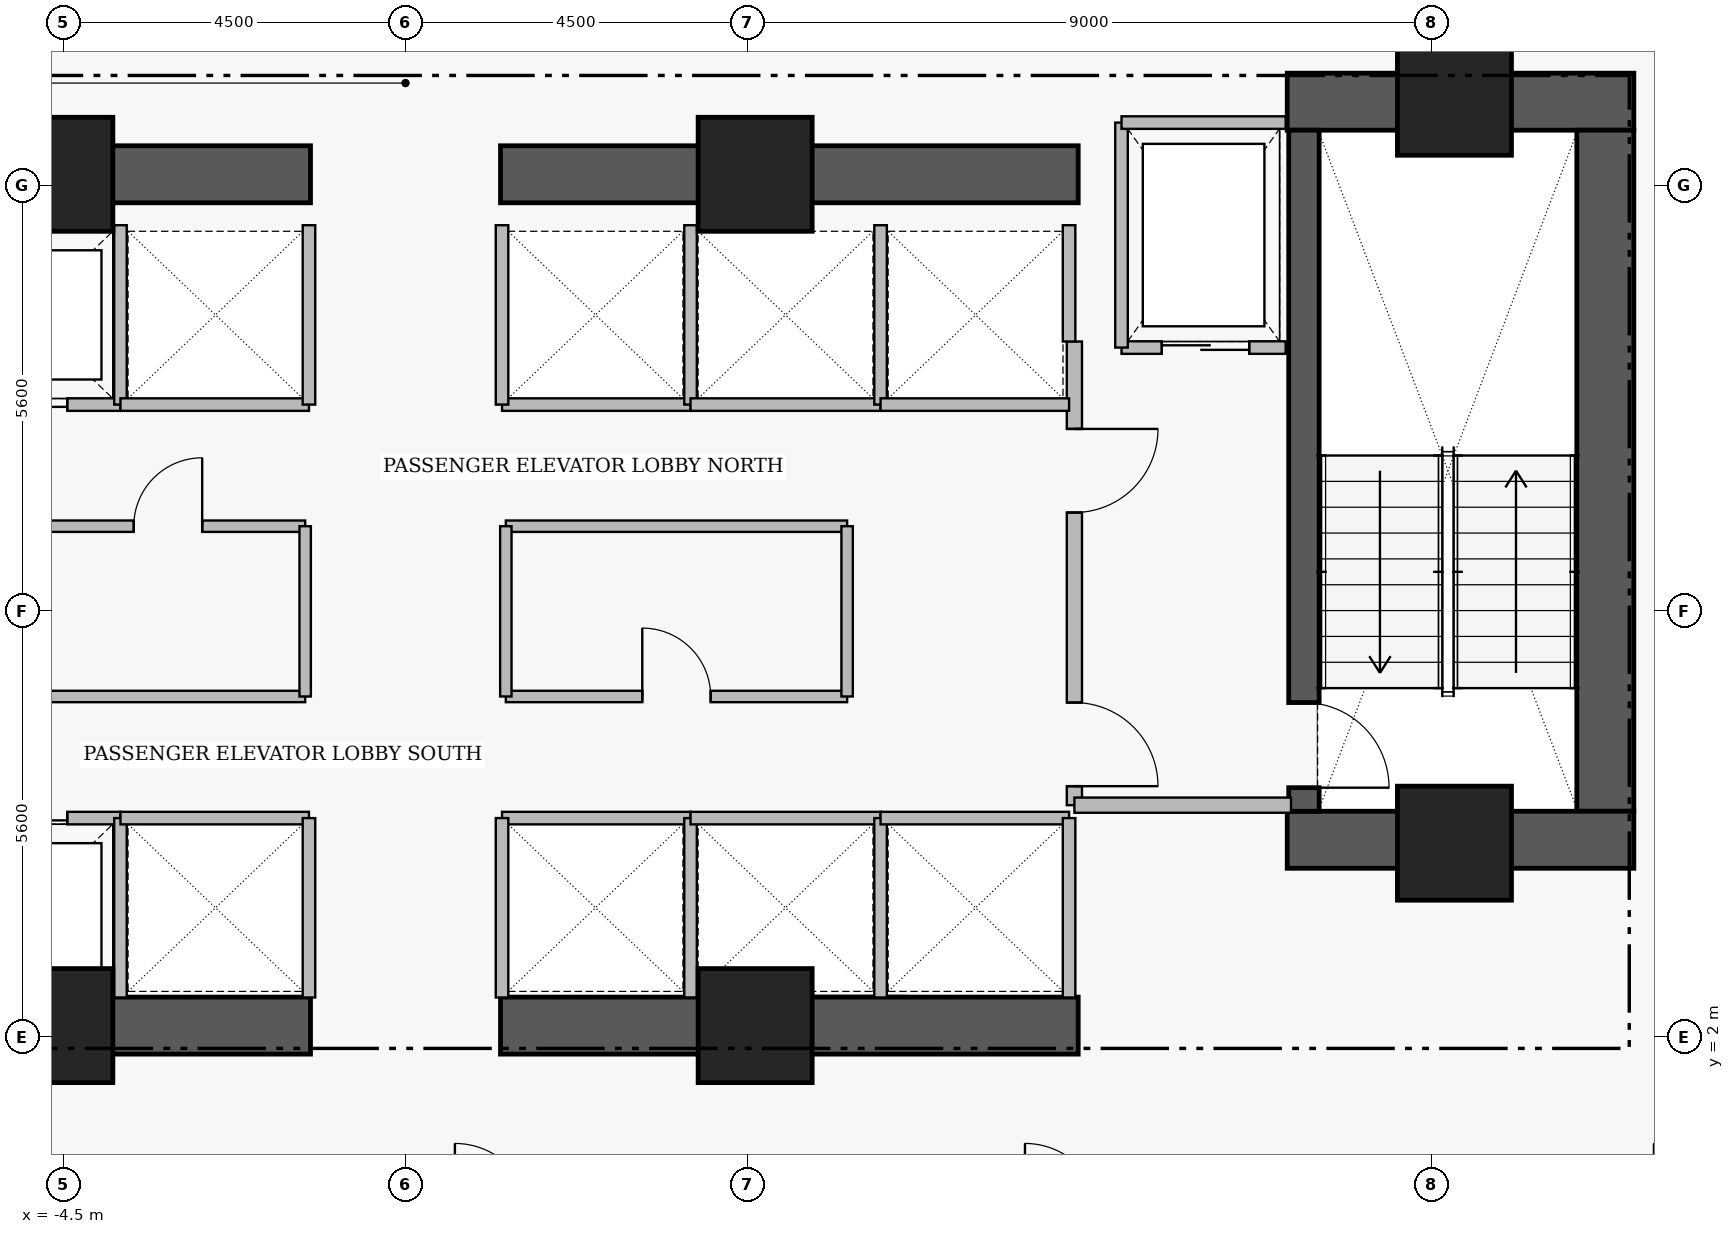
"""IFC4 building model, lengths in metres.
Left out: names, types, materials, properties, quantities, classifications, styles, units other than length and angle.
Written with IfcOpenShell. Run it as: python <this file> out.ifc"""

import sys

from ifc_helpers import new_model, si_unit, direction, frame, frame_2d, origin, origin_2d, place, context, subcontext, project, spatial, rectangle, extrude, element, fill, save


model = new_model("IFC4")
c1 = context("Model", 3, precision=1e-05, world=origin(), true_north=direction((0.0, 1.0)))
c2 = subcontext(c1, "Body", "Model", "MODEL_VIEW")
j1 = project(units=[si_unit("LENGTHUNIT", "METRE"), si_unit("PLANEANGLEUNIT", "RADIAN")], contexts=[c1])
p1 = place(None, origin())
s1 = spatial("IfcSite", under=j1, at=p1, CompositionType="ELEMENT")
p2 = place(p1, origin())
s2 = spatial("IfcBuilding", under=s1, at=p2, CompositionType="ELEMENT")
p3 = place(p2, frame((0.0, 0.0, 95.65)))
s3 = spatial("IfcBuildingStorey", under=s2, at=p3, CompositionType="ELEMENT", Elevation=95.65)
p4 = place(p3, frame((11.6, 14.305, 0.0), z_axis=(0.0, 0.0, 1.0), x_axis=(1.0, 0.0, 0.0)))
e1 = element("IfcWall", 1, at=p4, inside=s3, PredefinedType="SHEAR", context=c2, shape_type="SweptSolid", body=[
    extrude(rectangle(XDim=4.56, YDim=0.75, at=frame_2d((2.28, 0.0))), origin(), (0.0, 0.0, 1.0), 3.46),
])
p5 = place(p3, frame((15.785, 4.97, 0.0), z_axis=(0.0, 0.0, 1.0), x_axis=(0.0, 1.0, 0.0)))
e2 = element("IfcWall", 2, at=p5, inside=s3, PredefinedType="SHEAR", context=c2, shape_type="SweptSolid", body=[
    extrude(rectangle(XDim=8.96, YDim=0.75, at=frame_2d((4.48, 0.0))), origin(), (0.0, 0.0, 1.0), 3.46),
])
p6 = place(p3, frame((11.6, 4.595, 0.0), z_axis=(0.0, 0.0, 1.0), x_axis=(1.0, 0.0, 0.0)))
e3 = element("IfcWall", 3, at=p6, inside=s3, PredefinedType="SHEAR", context=c2, shape_type="SweptSolid", body=[
    extrude(rectangle(XDim=4.56, YDim=0.75, at=frame_2d((2.28, 0.0))), origin(), (0.0, 0.0, 1.0), 3.46),
])
for number, where, z_axis, x_axis in (
    (4, (-8.85, 2.15, 0.0), (0.0, 0.0, 1.0), (1.0, 0.0, 0.0)),
    (5, (1.25, 2.15, 0.0), (0.0, 0.0, 1.0), (1.0, 0.0, 0.0)),
    (6, (-8.85, 13.35, 0.0), (0.0, 0.0, 1.0), (1.0, 0.0, 0.0)),
    (7, (1.25, 13.35, 0.0), (0.0, 0.0, 1.0), (1.0, 0.0, 0.0)),
):
    element("IfcWall", number, at=place(p3, frame(where, z_axis=z_axis, x_axis=x_axis)), inside=s3, PredefinedType="SHEAR", context=c2, shape_type="SweptSolid", body=[
        extrude(rectangle(XDim=7.6, YDim=0.75, at=frame_2d((3.8, 0.0))), origin(), (0.0, 0.0, 1.0), 3.43),
    ])
p7 = place(p3, frame((11.82, 13.93, 0.0), z_axis=(0.0, 0.0, 1.0), x_axis=(0.0, -1.0, 0.0)))
e8 = element("IfcWall", 8, at=p7, inside=s3, PredefinedType="SHEAR", context=c2, shape_type="SweptSolid", body=[
    extrude(rectangle(XDim=8.96, YDim=0.4, at=frame_2d((4.48, 0.0))), origin(), (0.0, 0.0, 1.0), 3.46),
])
p8 = place(p7, frame((7.53, 0.0, 0.0)))
e9 = element("IfcOpeningElement", 9, at=p8, cuts=e8, PredefinedType="OPENING", context=c2, shape_type="SweptSolid", body=[
    extrude(rectangle(XDim=1.12, YDim=2.22, at=frame_2d((0.56, 1.11))), frame((0.0, 0.21, 0.0), z_axis=(0.0, -1.0, 0.0), x_axis=(1.0, 0.0, 0.0)), (0.0, 0.0, 1.0), 0.42),
])
for number, where, z_axis, x_axis in (
    (10, (-4.6, 13.35, 0.0), (0.0, 0.0, 1.0), (1.0, 0.0, 0.0)),
    (11, (4.6, 13.35, 0.0), (0.0, 0.0, 1.0), (1.0, 0.0, 0.0)),
    (12, (13.8, 14.35, 0.0), (0.0, 0.0, 1.0), (1.0, 0.0, 0.0)),
    (13, (-4.6, 2.15, 0.0), (0.0, 0.0, 1.0), (1.0, 0.0, 0.0)),
    (14, (4.6, 2.15, 0.0), (0.0, 0.0, 1.0), (1.0, 0.0, 0.0)),
    (15, (13.8, 4.55, 0.0), (0.0, 0.0, 1.0), (1.0, 0.0, 0.0)),
):
    element("IfcColumn", number, at=place(p3, frame(where, z_axis=z_axis, x_axis=x_axis)), inside=s3, PredefinedType="COLUMN", context=c2, shape_type="SweptSolid", body=[
        extrude(rectangle(XDim=1.5, YDim=1.5, at=origin_2d()), origin(), (0.0, 0.0, 1.0), 3.65),
    ])
p9 = place(p3, frame((8.8, 11.15, 0.0), z_axis=(0.0, 0.0, 1.0), x_axis=(0.0, -1.0, 0.0)))
e16 = element("IfcWall", 16, at=p9, inside=s3, PredefinedType="PARTITIONING", context=c2, shape_type="SweptSolid", body=[
    extrude(rectangle(XDim=6.1, YDim=0.2, at=frame_2d((3.05, 0.0))), origin(), (0.0, 0.0, 1.0), 3.43),
])
p10 = place(p9, frame((1.15, 0.0, 0.0)))
e17 = element("IfcOpeningElement", 17, at=p10, cuts=e16, PredefinedType="OPENING", context=c2, shape_type="SweptSolid", body=[
    extrude(rectangle(XDim=1.1, YDim=2.2, at=frame_2d((0.55, 1.1))), frame((0.0, 0.11, 0.0), z_axis=(0.0, -1.0, 0.0), x_axis=(1.0, 0.0, 0.0)), (0.0, 0.0, 1.0), 0.22),
])
p11 = place(p9, frame((4.75, 0.0, 0.0)))
e18 = element("IfcOpeningElement", 18, at=p11, cuts=e16, PredefinedType="OPENING", context=c2, shape_type="SweptSolid", body=[
    extrude(rectangle(XDim=1.1, YDim=2.2, at=frame_2d((0.55, 1.1))), frame((0.0, 0.11, 0.0), z_axis=(0.0, -1.0, 0.0), x_axis=(1.0, 0.0, 0.0)), (0.0, 0.0, 1.0), 0.22),
])
p12 = place(p3, frame((9.42, 11.07, 0.0), z_axis=(0.0, 0.0, 1.0), x_axis=(1.0, 0.0, 0.0)))
e19 = element("IfcWall", 19, at=p12, inside=s3, PredefinedType="PARTITIONING", context=c2, shape_type="SweptSolid", body=[
    extrude(rectangle(XDim=2.16, YDim=0.165, at=frame_2d((1.08, 0.0))), origin(), (0.0, 0.0, 1.0), 3.43),
])
p13 = place(p12, frame((0.53, 0.0, 0.0)))
e20 = element("IfcOpeningElement", 20, at=p13, cuts=e19, PredefinedType="OPENING", context=c2, shape_type="SweptSolid", body=[
    extrude(rectangle(XDim=1.15, YDim=2.25, at=frame_2d((0.575, 1.125))), frame((0.0, 0.093, 0.0), z_axis=(0.0, -1.0, 0.0), x_axis=(1.0, 0.0, 0.0)), (0.0, 0.0, 1.0), 0.185),
])
p14 = place(p3, frame((-6.25, 4.88, 0.0), z_axis=(0.0, 0.0, 1.0), x_axis=(1.0, 0.0, 0.0)))
e21 = element("IfcWall", 21, at=p14, inside=s3, PredefinedType="PARTITIONING", context=c2, shape_type="SweptSolid", body=[
    extrude(rectangle(XDim=2.5, YDim=0.165, at=frame_2d((1.25, 0.0))), origin(), (0.0, 0.0, 1.0), 3.43),
])
p15 = place(p14, frame((0.7, 0.0, 0.0)))
e22 = element("IfcOpeningElement", 22, at=p15, cuts=e21, PredefinedType="OPENING", context=c2, shape_type="SweptSolid", body=[
    extrude(rectangle(XDim=1.1, YDim=2.25, at=frame_2d((0.55, 1.125))), frame((0.0, 0.093, 0.0), z_axis=(0.0, -1.0, 0.0), x_axis=(1.0, 0.0, 0.0)), (0.0, 0.0, 1.0), 0.185),
])
p16 = place(p3, frame((-6.25, 10.32, 0.0), z_axis=(0.0, 0.0, 1.0), x_axis=(1.0, 0.0, 0.0)))
e23 = element("IfcWall", 23, at=p16, inside=s3, PredefinedType="PARTITIONING", context=c2, shape_type="SweptSolid", body=[
    extrude(rectangle(XDim=2.5, YDim=0.165, at=frame_2d((1.25, 0.0))), origin(), (0.0, 0.0, 1.0), 3.43),
])
p17 = place(p16, frame((0.7, 0.0, 0.0)))
e24 = element("IfcOpeningElement", 24, at=p17, cuts=e23, PredefinedType="OPENING", context=c2, shape_type="SweptSolid", body=[
    extrude(rectangle(XDim=1.1, YDim=2.25, at=frame_2d((0.55, 1.125))), frame((0.0, 0.093, 0.0), z_axis=(0.0, -1.0, 0.0), x_axis=(1.0, 0.0, 0.0)), (0.0, 0.0, 1.0), 0.185),
])
p18 = place(p3, frame((-4.93, 8.72, 0.0), z_axis=(0.0, 0.0, 1.0), x_axis=(1.0, 0.0, 0.0)))
e25 = element("IfcWall", 25, at=p18, inside=s3, PredefinedType="PARTITIONING", context=c2, shape_type="SweptSolid", body=[
    extrude(rectangle(XDim=3.61, YDim=0.15, at=frame_2d((1.805, 0.0))), origin(), (0.0, 0.0, 1.0), 3.43),
])
p19 = place(p18, frame((1.355, 0.0, 0.0)))
e26 = element("IfcOpeningElement", 26, at=p19, cuts=e25, PredefinedType="OPENING", context=c2, shape_type="SweptSolid", body=[
    extrude(rectangle(XDim=0.9, YDim=2.15, at=frame_2d((0.45, 1.075))), frame((0.0, 0.085, 0.0), z_axis=(0.0, -1.0, 0.0), x_axis=(1.0, 0.0, 0.0)), (0.0, 0.0, 1.0), 0.17),
])
p20 = place(p3, frame((1.32, 6.48, 0.0), z_axis=(0.0, 0.0, 1.0), x_axis=(1.0, 0.0, 0.0)))
e27 = element("IfcWall", 27, at=p20, inside=s3, PredefinedType="PARTITIONING", context=c2, shape_type="SweptSolid", body=[
    extrude(rectangle(XDim=4.49, YDim=0.15, at=frame_2d((2.245, 0.0))), origin(), (0.0, 0.0, 1.0), 3.43),
])
p21 = place(p20, frame((1.795, 0.0, 0.0)))
e28 = element("IfcOpeningElement", 28, at=p21, cuts=e27, PredefinedType="OPENING", context=c2, shape_type="SweptSolid", body=[
    extrude(rectangle(XDim=0.9, YDim=2.15, at=frame_2d((0.45, 1.075))), frame((0.0, 0.085, 0.0), z_axis=(0.0, -1.0, 0.0), x_axis=(1.0, 0.0, 0.0)), (0.0, 0.0, 1.0), 0.17),
])
p22 = place(p3, frame((8.8, 5.05, 0.0), z_axis=(0.0, 0.0, 1.0), x_axis=(1.0, 0.0, 0.0)))
e29 = element("IfcWall", 29, at=p22, inside=s3, PredefinedType="PARTITIONING", context=c2, shape_type="SweptSolid", body=[
    extrude(rectangle(XDim=2.85, YDim=0.2, at=frame_2d((1.425, 0.0))), origin(), (0.0, 0.0, 1.0), 3.43),
])
p23 = place(p3, frame((9.42, 11.07, 0.0), z_axis=(0.0, 0.0, 1.0), x_axis=(0.0, 1.0, 0.0)))
e30 = element("IfcWall", 30, at=p23, inside=s3, PredefinedType="PARTITIONING", context=c2, shape_type="SweptSolid", body=[
    extrude(rectangle(XDim=2.96, YDim=0.165, at=frame_2d((1.48, 0.0))), origin(), (0.0, 0.0, 1.0), 3.43),
])
p24 = place(p3, frame((9.42, 14.03, 0.0), z_axis=(0.0, 0.0, 1.0), x_axis=(1.0, 0.0, 0.0)))
e31 = element("IfcWall", 31, at=p24, inside=s3, PredefinedType="PARTITIONING", context=c2, shape_type="SweptSolid", body=[
    extrude(rectangle(XDim=2.16, YDim=0.165, at=frame_2d((1.08, 0.0))), origin(), (0.0, 0.0, 1.0), 3.43),
])
for number, where, z_axis, x_axis in (
    (32, (-3.75, 2.52, 0.0), (0.0, 0.0, 1.0), (0.0, 1.0, 0.0)),
    (33, (-3.75, 10.32, 0.0), (0.0, 0.0, 1.0), (0.0, 1.0, 0.0)),
):
    element("IfcWall", number, at=place(p3, frame(where, z_axis=z_axis, x_axis=x_axis)), inside=s3, PredefinedType="PARTITIONING", context=c2, shape_type="SweptSolid", body=[
        extrude(rectangle(XDim=2.36, YDim=0.165, at=frame_2d((1.18, 0.0))), origin(), (0.0, 0.0, 1.0), 3.43),
    ])
p25 = place(p3, frame((-3.75, 4.88, 0.0), z_axis=(0.0, 0.0, 1.0), x_axis=(1.0, 0.0, 0.0)))
e34 = element("IfcWall", 34, at=p25, inside=s3, PredefinedType="PARTITIONING", context=c2, shape_type="SweptSolid", body=[
    extrude(rectangle(XDim=2.48, YDim=0.165, at=frame_2d((1.24, 0.0))), origin(), (0.0, 0.0, 1.0), 3.43),
])
p26 = place(p3, frame((-1.27, 2.52, 0.0), z_axis=(0.0, 0.0, 1.0), x_axis=(0.0, 1.0, 0.0)))
e35 = element("IfcWall", 35, at=p26, inside=s3, PredefinedType="PARTITIONING", context=c2, shape_type="SweptSolid", body=[
    extrude(rectangle(XDim=2.36, YDim=0.165, at=frame_2d((1.18, 0.0))), origin(), (0.0, 0.0, 1.0), 3.43),
])
p27 = place(p3, frame((1.27, 4.88, 0.0), z_axis=(0.0, 0.0, 1.0), x_axis=(1.0, 0.0, 0.0)))
e36 = element("IfcWall", 36, at=p27, inside=s3, PredefinedType="PARTITIONING", context=c2, shape_type="SweptSolid", body=[
    extrude(rectangle(XDim=2.48, YDim=0.165, at=frame_2d((1.24, 0.0))), origin(), (0.0, 0.0, 1.0), 3.43),
])
for number, where, z_axis, x_axis in (
    (37, (1.27, 2.52, 0.0), (0.0, 0.0, 1.0), (0.0, 1.0, 0.0)),
    (38, (3.75, 2.52, 0.0), (0.0, 0.0, 1.0), (0.0, 1.0, 0.0)),
):
    element("IfcWall", number, at=place(p3, frame(where, z_axis=z_axis, x_axis=x_axis)), inside=s3, PredefinedType="PARTITIONING", context=c2, shape_type="SweptSolid", body=[
        extrude(rectangle(XDim=2.36, YDim=0.165, at=frame_2d((1.18, 0.0))), origin(), (0.0, 0.0, 1.0), 3.43),
    ])
p28 = place(p3, frame((-3.75, 10.32, 0.0), z_axis=(0.0, 0.0, 1.0), x_axis=(1.0, 0.0, 0.0)))
e39 = element("IfcWall", 39, at=p28, inside=s3, PredefinedType="PARTITIONING", context=c2, shape_type="SweptSolid", body=[
    extrude(rectangle(XDim=2.48, YDim=0.165, at=frame_2d((1.24, 0.0))), origin(), (0.0, 0.0, 1.0), 3.43),
])
p29 = place(p3, frame((-1.27, 10.32, 0.0), z_axis=(0.0, 0.0, 1.0), x_axis=(0.0, 1.0, 0.0)))
e40 = element("IfcWall", 40, at=p29, inside=s3, PredefinedType="PARTITIONING", context=c2, shape_type="SweptSolid", body=[
    extrude(rectangle(XDim=2.36, YDim=0.165, at=frame_2d((1.18, 0.0))), origin(), (0.0, 0.0, 1.0), 3.43),
])
p30 = place(p3, frame((1.27, 10.32, 0.0), z_axis=(0.0, 0.0, 1.0), x_axis=(1.0, 0.0, 0.0)))
e41 = element("IfcWall", 41, at=p30, inside=s3, PredefinedType="PARTITIONING", context=c2, shape_type="SweptSolid", body=[
    extrude(rectangle(XDim=2.48, YDim=0.165, at=frame_2d((1.24, 0.0))), origin(), (0.0, 0.0, 1.0), 3.43),
])
for number, where, z_axis, x_axis in (
    (42, (1.27, 10.32, 0.0), (0.0, 0.0, 1.0), (0.0, 1.0, 0.0)),
    (43, (3.75, 10.32, 0.0), (0.0, 0.0, 1.0), (0.0, 1.0, 0.0)),
):
    element("IfcWall", number, at=place(p3, frame(where, z_axis=z_axis, x_axis=x_axis)), inside=s3, PredefinedType="PARTITIONING", context=c2, shape_type="SweptSolid", body=[
        extrude(rectangle(XDim=2.36, YDim=0.165, at=frame_2d((1.18, 0.0))), origin(), (0.0, 0.0, 1.0), 3.43),
    ])
p31 = place(p3, frame((3.75, 4.88, 0.0), z_axis=(0.0, 0.0, 1.0), x_axis=(1.0, 0.0, 0.0)))
e44 = element("IfcWall", 44, at=p31, inside=s3, PredefinedType="PARTITIONING", context=c2, shape_type="SweptSolid", body=[
    extrude(rectangle(XDim=2.5, YDim=0.165, at=frame_2d((1.25, 0.0))), origin(), (0.0, 0.0, 1.0), 3.43),
])
p32 = place(p3, frame((6.25, 2.52, 0.0), z_axis=(0.0, 0.0, 1.0), x_axis=(0.0, 1.0, 0.0)))
e45 = element("IfcWall", 45, at=p32, inside=s3, PredefinedType="PARTITIONING", context=c2, shape_type="SweptSolid", body=[
    extrude(rectangle(XDim=2.36, YDim=0.165, at=frame_2d((1.18, 0.0))), origin(), (0.0, 0.0, 1.0), 3.43),
])
p33 = place(p3, frame((6.25, 4.88, 0.0), z_axis=(0.0, 0.0, 1.0), x_axis=(1.0, 0.0, 0.0)))
e46 = element("IfcWall", 46, at=p33, inside=s3, PredefinedType="PARTITIONING", context=c2, shape_type="SweptSolid", body=[
    extrude(rectangle(XDim=2.48, YDim=0.165, at=frame_2d((1.24, 0.0))), origin(), (0.0, 0.0, 1.0), 3.43),
])
p34 = place(p3, frame((8.73, 2.52, 0.0), z_axis=(0.0, 0.0, 1.0), x_axis=(0.0, 1.0, 0.0)))
e47 = element("IfcWall", 47, at=p34, inside=s3, PredefinedType="PARTITIONING", context=c2, shape_type="SweptSolid", body=[
    extrude(rectangle(XDim=2.36, YDim=0.165, at=frame_2d((1.18, 0.0))), origin(), (0.0, 0.0, 1.0), 3.43),
])
p35 = place(p3, frame((3.75, 10.32, 0.0), z_axis=(0.0, 0.0, 1.0), x_axis=(1.0, 0.0, 0.0)))
e48 = element("IfcWall", 48, at=p35, inside=s3, PredefinedType="PARTITIONING", context=c2, shape_type="SweptSolid", body=[
    extrude(rectangle(XDim=2.5, YDim=0.165, at=frame_2d((1.25, 0.0))), origin(), (0.0, 0.0, 1.0), 3.43),
])
p36 = place(p3, frame((6.25, 10.32, 0.0), z_axis=(0.0, 0.0, 1.0), x_axis=(0.0, 1.0, 0.0)))
e49 = element("IfcWall", 49, at=p36, inside=s3, PredefinedType="PARTITIONING", context=c2, shape_type="SweptSolid", body=[
    extrude(rectangle(XDim=2.36, YDim=0.165, at=frame_2d((1.18, 0.0))), origin(), (0.0, 0.0, 1.0), 3.43),
])
p37 = place(p3, frame((6.25, 10.32, 0.0), z_axis=(0.0, 0.0, 1.0), x_axis=(1.0, 0.0, 0.0)))
e50 = element("IfcWall", 50, at=p37, inside=s3, PredefinedType="PARTITIONING", context=c2, shape_type="SweptSolid", body=[
    extrude(rectangle(XDim=2.48, YDim=0.165, at=frame_2d((1.24, 0.0))), origin(), (0.0, 0.0, 1.0), 3.43),
])
p38 = place(p3, frame((8.73, 11.15, 0.0), z_axis=(0.0, 0.0, 1.0), x_axis=(0.0, 1.0, 0.0)))
e51 = element("IfcWall", 51, at=p38, inside=s3, PredefinedType="PARTITIONING", context=c2, shape_type="SweptSolid", body=[
    extrude(rectangle(XDim=1.53, YDim=0.165, at=frame_2d((0.765, 0.0))), origin(), (0.0, 0.0, 1.0), 3.43),
])
p39 = place(p3, frame((-4.93, 6.48, 0.0), z_axis=(0.0, 0.0, 1.0), x_axis=(1.0, 0.0, 0.0)))
e52 = element("IfcWall", 52, at=p39, inside=s3, PredefinedType="PARTITIONING", context=c2, shape_type="SweptSolid", body=[
    extrude(rectangle(XDim=3.61, YDim=0.15, at=frame_2d((1.805, 0.0))), origin(), (0.0, 0.0, 1.0), 3.43),
])
p40 = place(p3, frame((-1.32, 6.48, 0.0), z_axis=(0.0, 0.0, 1.0), x_axis=(0.0, 1.0, 0.0)))
e53 = element("IfcWall", 53, at=p40, inside=s3, PredefinedType="PARTITIONING", context=c2, shape_type="SweptSolid", body=[
    extrude(rectangle(XDim=2.24, YDim=0.15, at=frame_2d((1.12, 0.0))), origin(), (0.0, 0.0, 1.0), 3.43),
])
p41 = place(p3, frame((1.32, 8.72, 0.0), z_axis=(0.0, 0.0, 1.0), x_axis=(1.0, 0.0, 0.0)))
e54 = element("IfcWall", 54, at=p41, inside=s3, PredefinedType="PARTITIONING", context=c2, shape_type="SweptSolid", body=[
    extrude(rectangle(XDim=4.49, YDim=0.15, at=frame_2d((2.245, 0.0))), origin(), (0.0, 0.0, 1.0), 3.43),
])
for number, where, z_axis, x_axis in (
    (55, (1.32, 6.48, 0.0), (0.0, 0.0, 1.0), (0.0, 1.0, 0.0)),
    (56, (5.81, 6.48, 0.0), (0.0, 0.0, 1.0), (0.0, 1.0, 0.0)),
):
    element("IfcWall", number, at=place(p3, frame(where, z_axis=z_axis, x_axis=x_axis)), inside=s3, PredefinedType="PARTITIONING", context=c2, shape_type="SweptSolid", body=[
        extrude(rectangle(XDim=2.24, YDim=0.15, at=frame_2d((1.12, 0.0))), origin(), (0.0, 0.0, 1.0), 3.43),
    ])
p42 = place(p8, origin())
e57 = element("IfcDoor", 57, at=p42, inside=s3, OperationType="SINGLE_SWING_RIGHT", PredefinedType="DOOR", context=c2, shape_type="SweptSolid", body=[
    extrude(rectangle(XDim=1.12, YDim=2.22, at=frame_2d((0.56, 1.11))), frame((0.0, 0.025, 0.0), z_axis=(0.0, -1.0, 0.0), x_axis=(1.0, 0.0, 0.0)), (0.0, 0.0, 1.0), 0.05),
])
fill(e9, e57)
p43 = place(p10, origin())
e58 = element("IfcDoor", 58, at=p43, inside=s3, OperationType="SINGLE_SWING_LEFT", PredefinedType="DOOR", context=c2, shape_type="SweptSolid", body=[
    extrude(rectangle(XDim=1.1, YDim=2.2, at=frame_2d((0.55, 1.1))), frame((0.0, 0.025, 0.0), z_axis=(0.0, -1.0, 0.0), x_axis=(1.0, 0.0, 0.0)), (0.0, 0.0, 1.0), 0.05),
])
fill(e17, e58)
p44 = place(p11, origin())
e59 = element("IfcDoor", 59, at=p44, inside=s3, OperationType="SINGLE_SWING_RIGHT", PredefinedType="DOOR", context=c2, shape_type="SweptSolid", body=[
    extrude(rectangle(XDim=1.1, YDim=2.2, at=frame_2d((0.55, 1.1))), frame((0.0, 0.025, 0.0), z_axis=(0.0, -1.0, 0.0), x_axis=(1.0, 0.0, 0.0)), (0.0, 0.0, 1.0), 0.05),
])
fill(e18, e59)
p45 = place(p13, origin())
e60 = element("IfcDoor", 60, at=p45, inside=s3, OperationType="SLIDING_TO_LEFT", PredefinedType="DOOR", context=c2, shape_type="SweptSolid", body=[
    extrude(rectangle(XDim=1.15, YDim=2.25, at=frame_2d((0.575, 1.125))), frame((0.0, 0.025, 0.0), z_axis=(0.0, -1.0, 0.0), x_axis=(1.0, 0.0, 0.0)), (0.0, 0.0, 1.0), 0.05),
])
fill(e20, e60)
p46 = place(p15, origin())
e61 = element("IfcDoor", 61, at=p46, inside=s3, OperationType="SLIDING_TO_LEFT", PredefinedType="DOOR", context=c2, shape_type="SweptSolid", body=[
    extrude(rectangle(XDim=1.1, YDim=2.25, at=frame_2d((0.55, 1.125))), frame((0.0, 0.025, 0.0), z_axis=(0.0, -1.0, 0.0), x_axis=(1.0, 0.0, 0.0)), (0.0, 0.0, 1.0), 0.05),
])
fill(e22, e61)
p47 = place(p17, origin())
e62 = element("IfcDoor", 62, at=p47, inside=s3, OperationType="SLIDING_TO_LEFT", PredefinedType="DOOR", context=c2, shape_type="SweptSolid", body=[
    extrude(rectangle(XDim=1.1, YDim=2.25, at=frame_2d((0.55, 1.125))), frame((0.0, 0.025, 0.0), z_axis=(0.0, -1.0, 0.0), x_axis=(1.0, 0.0, 0.0)), (0.0, 0.0, 1.0), 0.05),
])
fill(e24, e62)
p48 = place(p19, origin())
e63 = element("IfcDoor", 63, at=p48, inside=s3, OperationType="SINGLE_SWING_RIGHT", PredefinedType="DOOR", context=c2, shape_type="SweptSolid", body=[
    extrude(rectangle(XDim=0.9, YDim=2.15, at=frame_2d((0.45, 1.075))), frame((0.0, 0.025, 0.0), z_axis=(0.0, -1.0, 0.0), x_axis=(1.0, 0.0, 0.0)), (0.0, 0.0, 1.0), 0.05),
])
fill(e26, e63)
p49 = place(p21, origin())
e64 = element("IfcDoor", 64, at=p49, inside=s3, OperationType="SINGLE_SWING_LEFT", PredefinedType="DOOR", context=c2, shape_type="SweptSolid", body=[
    extrude(rectangle(XDim=0.9, YDim=2.15, at=frame_2d((0.45, 1.075))), frame((0.0, 0.025, 0.0), z_axis=(0.0, -1.0, 0.0), x_axis=(1.0, 0.0, 0.0)), (0.0, 0.0, 1.0), 0.05),
])
fill(e28, e64)
save(model, sys.argv[1])
